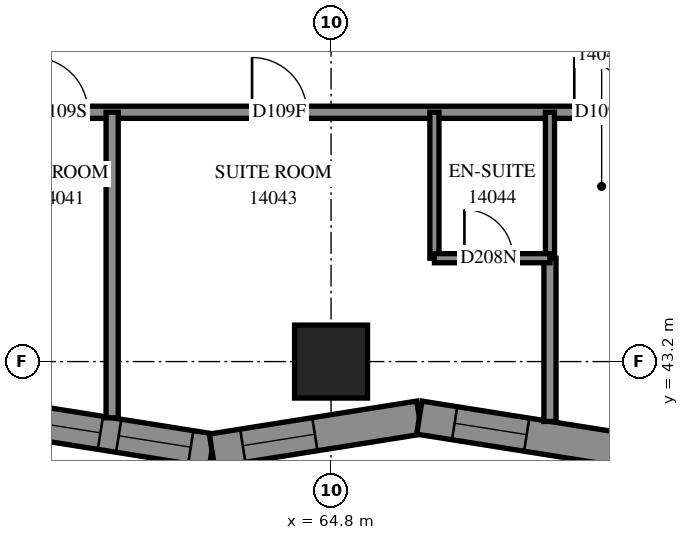
"""IFC4 building model, lengths in metres.
Left out: names, types, materials, properties, quantities, classifications, styles, units other than length and angle.
Written with IfcOpenShell. Run it as: python <this file> out.ifc"""

import sys

from ifc_helpers import new_model, si_unit, direction, frame, frame_2d, origin, origin_2d, place, context, subcontext, project, spatial, polyline, rectangle, outline, extrude, element, fill, save


model = new_model("IFC4")
c1 = context("Model", 3, precision=1e-05, world=origin(), true_north=direction((0.0, 1.0)))
c2 = subcontext(c1, "Body", "Model", "MODEL_VIEW")
j1 = project(units=[si_unit("LENGTHUNIT", "METRE"), si_unit("PLANEANGLEUNIT", "RADIAN")], contexts=[c1])
p1 = place(None, origin())
s1 = spatial("IfcSite", under=j1, at=p1, CompositionType="ELEMENT")
p2 = place(p1, origin())
s2 = spatial("IfcBuilding", under=s1, at=p2, CompositionType="ELEMENT")
p3 = place(p2, frame((0.0, 0.0, 54.2)))
s3 = spatial("IfcBuildingStorey", under=s2, at=p3, CompositionType="ELEMENT", Elevation=54.2)
p4 = place(p3, frame((64.8, 43.2, 0.0), z_axis=(0.0, 0.0, 1.0), x_axis=(1.0, 0.0, 0.0)))
e1 = element("IfcColumn", 1, at=p4, inside=s3, PredefinedType="COLUMN", context=c2, shape_type="SweptSolid", body=[
    extrude(rectangle(XDim=1.2, YDim=1.2, at=origin_2d()), origin(), (0.0, 0.0, 1.0), 3.1),
])
p5 = place(p3, frame((59.431, 42.279, 0.0), z_axis=(0.0, 0.0, 1.0), x_axis=(0.9876049061, -0.1569603434, 0.0)))
e2 = element("IfcWall", 2, at=p5, inside=s3, PredefinedType="SOLIDWALL", context=c2, shape_type="SweptSolid", body=[
    extrude(outline(polyline([(0.044, -0.275), (3.497, -0.275), (3.409, 0.275), (-0.044, 0.275), (0.044, -0.275)])), origin(), (0.0, 0.0, 1.0), 3.1),
])
p6 = place(p5, frame((0.396, 0.0, 0.5)))
e3 = element("IfcOpeningElement", 3, at=p6, cuts=e2, PredefinedType="OPENING", context=c2, shape_type="SweptSolid", body=[
    extrude(rectangle(XDim=1.2, YDim=2.45, at=frame_2d((0.6, 1.225))), frame((0.0, 0.285, 0.0), z_axis=(0.0, -1.0, 0.0), x_axis=(1.0, 0.0, 0.0)), (0.0, 0.0, 1.0), 0.57),
])
p7 = place(p5, frame((1.9, 0.0, 0.5)))
e4 = element("IfcOpeningElement", 4, at=p7, cuts=e2, PredefinedType="OPENING", context=c2, shape_type="SweptSolid", body=[
    extrude(rectangle(XDim=1.2, YDim=2.45, at=frame_2d((0.6, 1.225))), frame((0.0, 0.285, 0.0), z_axis=(0.0, -1.0, 0.0), x_axis=(1.0, 0.0, 0.0)), (0.0, 0.0, 1.0), 0.57),
])
p8 = place(p3, frame((62.841, 41.736, 0.0), z_axis=(0.0, 0.0, 1.0), x_axis=(0.9876056196, 0.1569558544, 0.0)))
e5 = element("IfcWall", 5, at=p8, inside=s3, PredefinedType="SOLIDWALL", context=c2, shape_type="SweptSolid", body=[
    extrude(outline(polyline([(-0.044, -0.275), (3.409, -0.275), (3.497, 0.275), (0.044, 0.275), (-0.044, -0.275)])), origin(), (0.0, 0.0, 1.0), 3.1),
])
p9 = place(p8, frame((0.513, 0.0, 0.5)))
e6 = element("IfcOpeningElement", 6, at=p9, cuts=e5, PredefinedType="OPENING", context=c2, shape_type="SweptSolid", body=[
    extrude(rectangle(XDim=1.2, YDim=2.45, at=frame_2d((0.6, 1.225))), frame((0.0, 0.285, 0.0), z_axis=(0.0, -1.0, 0.0), x_axis=(1.0, 0.0, 0.0)), (0.0, 0.0, 1.0), 0.57),
])
p10 = place(p3, frame((66.252, 42.279, 0.0), z_axis=(0.0, 0.0, 1.0), x_axis=(0.9876056196, -0.1569558544, 0.0)))
e7 = element("IfcWall", 7, at=p10, inside=s3, PredefinedType="SOLIDWALL", context=c2, shape_type="SweptSolid", body=[
    extrude(outline(polyline([(0.044, -0.275), (3.497, -0.275), (3.409, 0.275), (-0.044, 0.275), (0.044, -0.275)])), origin(), (0.0, 0.0, 1.0), 3.1),
])
p11 = place(p10, frame((0.588, 0.0, 0.5)))
e8 = element("IfcOpeningElement", 8, at=p11, cuts=e7, PredefinedType="OPENING", context=c2, shape_type="SweptSolid", body=[
    extrude(rectangle(XDim=1.2, YDim=2.45, at=frame_2d((0.6, 1.225))), frame((0.0, 0.285, 0.0), z_axis=(0.0, -1.0, 0.0), x_axis=(1.0, 0.0, 0.0)), (0.0, 0.0, 1.0), 0.57),
])
p12 = place(p3, frame((54.5, 47.3, 0.0), z_axis=(0.0, 0.0, 1.0), x_axis=(1.0, 0.0, 0.0)))
e9 = element("IfcWall", 9, at=p12, inside=s3, PredefinedType="PARTITIONING", context=c2, shape_type="SweptSolid", body=[
    extrude(rectangle(XDim=19.56, YDim=0.2, at=frame_2d((9.78, 0.0))), origin(), (0.0, 0.0, 1.0), 3.1),
])
p13 = place(p12, frame((0.23, 0.0, 0.0)))
e10 = element("IfcOpeningElement", 10, at=p13, cuts=e9, PredefinedType="OPENING", context=c2, shape_type="SweptSolid", body=[
    extrude(rectangle(XDim=1.0, YDim=2.1, at=frame_2d((0.5, 1.05))), frame((0.0, 0.11, 0.0), z_axis=(0.0, -1.0, 0.0), x_axis=(1.0, 0.0, 0.0)), (0.0, 0.0, 1.0), 0.22),
])
p14 = place(p12, frame((5.4, 0.0, 0.0)))
e11 = element("IfcOpeningElement", 11, at=p14, cuts=e9, PredefinedType="OPENING", context=c2, shape_type="SweptSolid", body=[
    extrude(rectangle(XDim=0.9, YDim=2.1, at=frame_2d((0.45, 1.05))), frame((0.0, 0.11, 0.0), z_axis=(0.0, -1.0, 0.0), x_axis=(1.0, 0.0, 0.0)), (0.0, 0.0, 1.0), 0.22),
])
p15 = place(p12, frame((9.001, 0.0, 0.0)))
e12 = element("IfcOpeningElement", 12, at=p15, cuts=e9, PredefinedType="OPENING", context=c2, shape_type="SweptSolid", body=[
    extrude(rectangle(XDim=0.9, YDim=2.1, at=frame_2d((0.45, 1.05))), frame((0.0, 0.11, 0.0), z_axis=(0.0, -1.0, 0.0), x_axis=(1.0, 0.0, 0.0)), (0.0, 0.0, 1.0), 0.22),
])
p16 = place(p12, frame((14.3, 0.0, 0.0)))
e13 = element("IfcOpeningElement", 13, at=p16, cuts=e9, PredefinedType="OPENING", context=c2, shape_type="SweptSolid", body=[
    extrude(rectangle(XDim=0.9, YDim=2.1, at=frame_2d((0.45, 1.05))), frame((0.0, 0.11, 0.0), z_axis=(0.0, -1.0, 0.0), x_axis=(1.0, 0.0, 0.0)), (0.0, 0.0, 1.0), 0.22),
])
p17 = place(p3, frame((61.2, 42.276, 0.0), z_axis=(0.0, 0.0, 1.0), x_axis=(0.0, 1.0, 0.0)))
e14 = element("IfcWall", 14, at=p17, inside=s3, PredefinedType="PARTITIONING", context=c2, shape_type="SweptSolid", body=[
    extrude(rectangle(XDim=5.024, YDim=0.2, at=frame_2d((2.512, 0.0))), origin(), (0.0, 0.0, 1.0), 3.1),
])
p18 = place(p3, frame((68.4, 42.215, 0.0), z_axis=(0.0, 0.0, 1.0), x_axis=(0.0, 1.0, 0.0)))
e15 = element("IfcWall", 15, at=p18, inside=s3, PredefinedType="PARTITIONING", context=c2, shape_type="SweptSolid", body=[
    extrude(rectangle(XDim=2.684, YDim=0.2, at=frame_2d((1.342, 0.0))), origin(), (0.0, 0.0, 1.0), 3.1),
])
for number, where, z_axis, x_axis in (
    (16, (66.5, 44.9, 0.0), (0.0, 0.0, 1.0), (0.0, 1.0, 0.0)),
    (17, (68.4, 44.9, 0.0), (0.0, 0.0, 1.0), (0.0, 1.0, 0.0)),
):
    element("IfcWall", number, at=place(p3, frame(where, z_axis=z_axis, x_axis=x_axis)), inside=s3, PredefinedType="PARTITIONING", context=c2, shape_type="SweptSolid", body=[
        extrude(rectangle(XDim=2.4, YDim=0.15, at=frame_2d((1.2, 0.0))), origin(), (0.0, 0.0, 1.0), 3.1),
    ])
p19 = place(p3, frame((66.5, 44.9, 0.0), z_axis=(0.0, 0.0, 1.0), x_axis=(1.0, 0.0, 0.0)))
e18 = element("IfcWall", 18, at=p19, inside=s3, PredefinedType="PARTITIONING", context=c2, shape_type="SweptSolid", body=[
    extrude(rectangle(XDim=1.9, YDim=0.15, at=frame_2d((0.95, 0.0))), origin(), (0.0, 0.0, 1.0), 3.1),
])
p20 = place(p19, frame((0.493, 0.0, 0.0)))
e19 = element("IfcOpeningElement", 19, at=p20, cuts=e18, PredefinedType="OPENING", context=c2, shape_type="SweptSolid", body=[
    extrude(rectangle(XDim=0.8, YDim=2.1, at=frame_2d((0.4, 1.05))), frame((0.0, 0.085, 0.0), z_axis=(0.0, -1.0, 0.0), x_axis=(1.0, 0.0, 0.0)), (0.0, 0.0, 1.0), 0.17),
])
p21 = place(p6, origin())
e20 = element("IfcWindow", 20, at=p21, inside=s3, PartitioningType="SINGLE_PANEL", PredefinedType="WINDOW", context=c2, shape_type="SweptSolid", body=[
    extrude(rectangle(XDim=1.2, YDim=2.45, at=frame_2d((0.6, 1.225))), frame((0.0, 0.155, 0.0), z_axis=(0.0, -1.0, 0.0), x_axis=(1.0, 0.0, 0.0)), (0.0, 0.0, 1.0), 0.06),
])
fill(e3, e20)
p22 = place(p7, origin())
e21 = element("IfcWindow", 21, at=p22, inside=s3, PartitioningType="SINGLE_PANEL", PredefinedType="WINDOW", context=c2, shape_type="SweptSolid", body=[
    extrude(rectangle(XDim=1.2, YDim=2.45, at=frame_2d((0.6, 1.225))), frame((0.0, 0.155, 0.0), z_axis=(0.0, -1.0, 0.0), x_axis=(1.0, 0.0, 0.0)), (0.0, 0.0, 1.0), 0.06),
])
fill(e4, e21)
p23 = place(p9, origin())
e22 = element("IfcWindow", 22, at=p23, inside=s3, PartitioningType="SINGLE_PANEL", PredefinedType="WINDOW", context=c2, shape_type="SweptSolid", body=[
    extrude(rectangle(XDim=1.2, YDim=2.45, at=frame_2d((0.6, 1.225))), frame((0.0, 0.155, 0.0), z_axis=(0.0, -1.0, 0.0), x_axis=(1.0, 0.0, 0.0)), (0.0, 0.0, 1.0), 0.06),
])
fill(e6, e22)
p24 = place(p11, origin())
e23 = element("IfcWindow", 23, at=p24, inside=s3, PartitioningType="SINGLE_PANEL", PredefinedType="WINDOW", context=c2, shape_type="SweptSolid", body=[
    extrude(rectangle(XDim=1.2, YDim=2.45, at=frame_2d((0.6, 1.225))), frame((0.0, 0.155, 0.0), z_axis=(0.0, -1.0, 0.0), x_axis=(1.0, 0.0, 0.0)), (0.0, 0.0, 1.0), 0.06),
])
fill(e8, e23)
p25 = place(p14, origin())
e24 = element("IfcDoor", 24, at=p25, inside=s3, OperationType="SINGLE_SWING_LEFT", PredefinedType="DOOR", context=c2, shape_type="SweptSolid", body=[
    extrude(rectangle(XDim=0.9, YDim=2.1, at=frame_2d((0.45, 1.05))), frame((0.0, 0.025, 0.0), z_axis=(0.0, -1.0, 0.0), x_axis=(1.0, 0.0, 0.0)), (0.0, 0.0, 1.0), 0.05),
])
fill(e11, e24)
p26 = place(p15, origin())
e25 = element("IfcDoor", 25, at=p26, inside=s3, OperationType="SINGLE_SWING_RIGHT", PredefinedType="DOOR", context=c2, shape_type="SweptSolid", body=[
    extrude(rectangle(XDim=0.9, YDim=2.1, at=frame_2d((0.45, 1.05))), frame((0.0, 0.025, 0.0), z_axis=(0.0, -1.0, 0.0), x_axis=(1.0, 0.0, 0.0)), (0.0, 0.0, 1.0), 0.05),
])
fill(e12, e25)
p27 = place(p20, origin())
e26 = element("IfcDoor", 26, at=p27, inside=s3, OperationType="SINGLE_SWING_RIGHT", PredefinedType="DOOR", context=c2, shape_type="SweptSolid", body=[
    extrude(rectangle(XDim=0.8, YDim=2.1, at=frame_2d((0.4, 1.05))), frame((0.0, 0.025, 0.0), z_axis=(0.0, -1.0, 0.0), x_axis=(1.0, 0.0, 0.0)), (0.0, 0.0, 1.0), 0.05),
])
fill(e19, e26)
p28 = place(p16, origin())
e27 = element("IfcDoor", 27, at=p28, inside=s3, OperationType="SINGLE_SWING_RIGHT", PredefinedType="DOOR", context=c2, shape_type="SweptSolid", body=[
    extrude(rectangle(XDim=0.9, YDim=2.1, at=frame_2d((0.45, 1.05))), frame((0.0, 0.025, 0.0), z_axis=(0.0, -1.0, 0.0), x_axis=(1.0, 0.0, 0.0)), (0.0, 0.0, 1.0), 0.05),
])
fill(e13, e27)
save(model, sys.argv[1])
